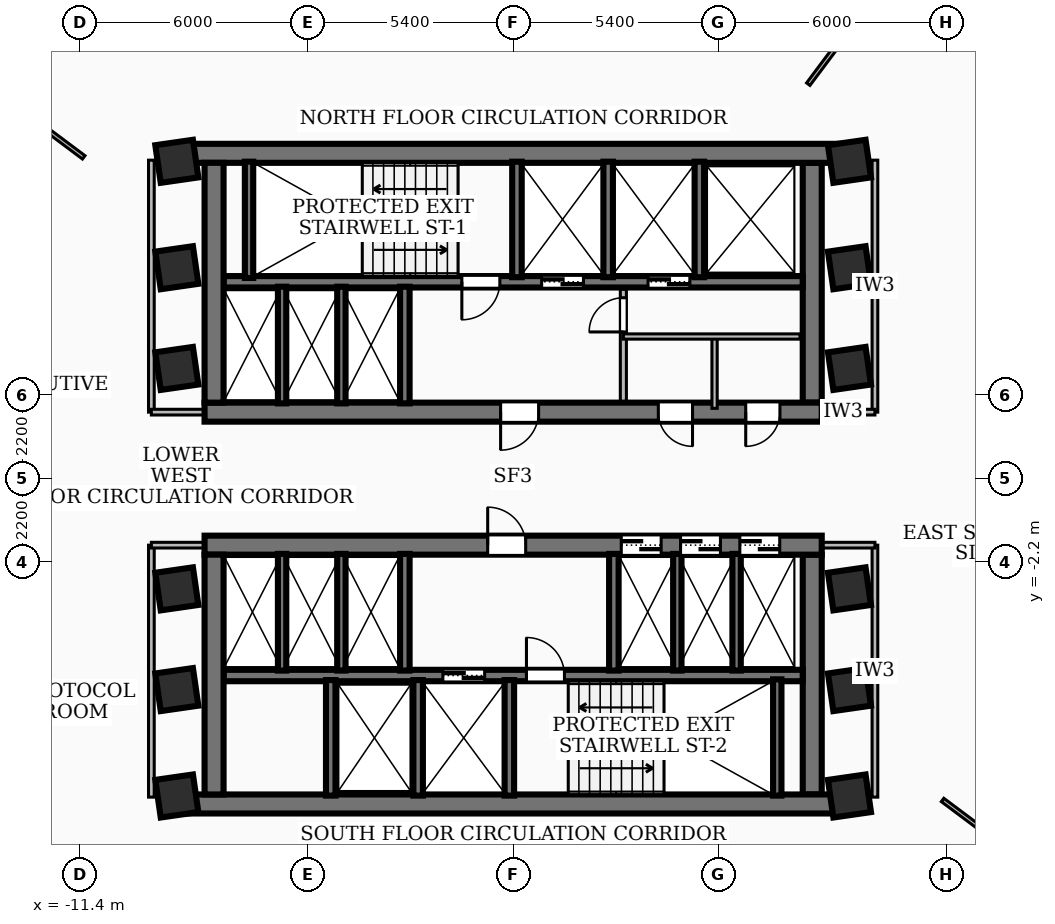
"""IFC4 building model, lengths in metres.
Left out: names, types, materials, properties, quantities, classifications, styles, units other than length and angle.
Written with IfcOpenShell. Run it as: python <this file> out.ifc"""

import sys

from ifc_helpers import new_model, si_unit, direction, frame, frame_2d, origin, origin_2d, place, context, subcontext, project, spatial, rectangle, extrude, element, fill, save


model = new_model("IFC4")
c1 = context("Model", 3, precision=1e-05, world=origin(), true_north=direction((0.0, 1.0)))
c2 = subcontext(c1, "Body", "Model", "MODEL_VIEW")
j1 = project(units=[si_unit("LENGTHUNIT", "METRE"), si_unit("PLANEANGLEUNIT", "RADIAN")], contexts=[c1])
p1 = place(None, origin())
s1 = spatial("IfcSite", under=j1, at=p1, CompositionType="ELEMENT")
p2 = place(p1, origin())
s2 = spatial("IfcBuilding", under=s1, at=p2, CompositionType="ELEMENT")
p3 = place(p2, frame((0.0, 0.0, 89.28)))
s3 = spatial("IfcBuildingStorey", under=s2, at=p3, CompositionType="ELEMENT", Elevation=89.28)
p4 = place(p3, frame((-8.78, 8.56, 0.0), z_axis=(0.0, 0.0, 1.0), x_axis=(1.0, 0.0, 0.0)))
e1 = element("IfcWall", 1, at=p4, inside=s3, PredefinedType="SHEAR", context=c2, shape_type="SweptSolid", body=[
    extrude(rectangle(XDim=17.56, YDim=0.5, at=frame_2d((8.78, 0.0))), origin(), (0.0, 0.0, 1.0), 3.34),
])
p5 = place(p3, frame((8.12, 1.75, 0.0), z_axis=(0.0, 0.0, 1.0), x_axis=(-1.0, 0.0, 0.0)))
e2 = element("IfcWall", 2, at=p5, inside=s3, PredefinedType="SHEAR", context=c2, shape_type="SweptSolid", body=[
    extrude(rectangle(XDim=16.24, YDim=0.5, at=frame_2d((8.12, 0.0))), origin(), (0.0, 0.0, 1.0), 3.34),
])
p6 = place(p5, frame((7.45, 0.0, 0.0)))
e3 = element("IfcOpeningElement", 3, at=p6, cuts=e2, PredefinedType="OPENING", context=c2, shape_type="SweptSolid", body=[
    extrude(rectangle(XDim=1.0, YDim=2.1, at=frame_2d((0.5, 1.05))), frame((0.0, 0.26, 0.0), z_axis=(0.0, -1.0, 0.0), x_axis=(1.0, 0.0, 0.0)), (0.0, 0.0, 1.0), 0.52),
])
p7 = place(p5, frame((3.4, 0.0, 0.0)))
e4 = element("IfcOpeningElement", 4, at=p7, cuts=e2, PredefinedType="OPENING", context=c2, shape_type="SweptSolid", body=[
    extrude(rectangle(XDim=0.9, YDim=2.06, at=frame_2d((0.45, 1.03))), frame((0.0, 0.26, 0.0), z_axis=(0.0, -1.0, 0.0), x_axis=(1.0, 0.0, 0.0)), (0.0, 0.0, 1.0), 0.52),
])
p8 = place(p5, frame((1.1, 0.0, 0.0)))
e5 = element("IfcOpeningElement", 5, at=p8, cuts=e2, PredefinedType="OPENING", context=c2, shape_type="SweptSolid", body=[
    extrude(rectangle(XDim=0.9, YDim=2.06, at=frame_2d((0.45, 1.03))), frame((0.0, 0.26, 0.0), z_axis=(0.0, -1.0, 0.0), x_axis=(1.0, 0.0, 0.0)), (0.0, 0.0, 1.0), 0.52),
])
for number, where, z_axis, x_axis in (
    (6, (-7.87, 2.0, 0.0), (0.0, 0.0, 1.0), (0.0, 1.0, 0.0)),
    (7, (7.87, 8.31, 0.0), (0.0, 0.0, 1.0), (0.0, -1.0, 0.0)),
):
    element("IfcWall", number, at=place(p3, frame(where, z_axis=z_axis, x_axis=x_axis)), inside=s3, PredefinedType="SHEAR", context=c2, shape_type="SweptSolid", body=[
        extrude(rectangle(XDim=6.31, YDim=0.5, at=frame_2d((3.155, 0.0))), origin(), (0.0, 0.0, 1.0), 3.34),
    ])
p9 = place(p3, frame((7.62, 5.18, 0.0), z_axis=(0.0, 0.0, 1.0), x_axis=(-1.0, 0.0, 0.0)))
e8 = element("IfcWall", 8, at=p9, inside=s3, PredefinedType="SOLIDWALL", context=c2, shape_type="SweptSolid", body=[
    extrude(rectangle(XDim=15.24, YDim=0.3, at=frame_2d((7.62, 0.0))), origin(), (0.0, 0.0, 1.0), 3.34),
])
p10 = place(p9, frame((5.77, 0.0, 0.0)))
e9 = element("IfcOpeningElement", 9, at=p10, cuts=e8, PredefinedType="OPENING", context=c2, shape_type="SweptSolid", body=[
    extrude(rectangle(XDim=1.1, YDim=2.15, at=frame_2d((0.55, 1.075))), frame((0.0, 0.16, 0.0), z_axis=(0.0, -1.0, 0.0), x_axis=(1.0, 0.0, 0.0)), (0.0, 0.0, 1.0), 0.32),
])
p11 = place(p9, frame((2.97, 0.0, 0.0)))
e10 = element("IfcOpeningElement", 10, at=p11, cuts=e8, PredefinedType="OPENING", context=c2, shape_type="SweptSolid", body=[
    extrude(rectangle(XDim=1.1, YDim=2.15, at=frame_2d((0.55, 1.075))), frame((0.0, 0.16, 0.0), z_axis=(0.0, -1.0, 0.0), x_axis=(1.0, 0.0, 0.0)), (0.0, 0.0, 1.0), 0.32),
])
p12 = place(p9, frame((7.97, 0.0, 0.0)))
e11 = element("IfcOpeningElement", 11, at=p12, cuts=e8, PredefinedType="OPENING", context=c2, shape_type="SweptSolid", body=[
    extrude(rectangle(XDim=1.0, YDim=2.1, at=frame_2d((0.5, 1.05))), frame((0.0, 0.16, 0.0), z_axis=(0.0, -1.0, 0.0), x_axis=(1.0, 0.0, 0.0)), (0.0, 0.0, 1.0), 0.32),
])
p13 = place(p3, frame((8.78, -8.56, 0.0), z_axis=(0.0, 0.0, 1.0), x_axis=(-1.0, 0.0, 0.0)))
e12 = element("IfcWall", 12, at=p13, inside=s3, PredefinedType="SHEAR", context=c2, shape_type="SweptSolid", body=[
    extrude(rectangle(XDim=17.56, YDim=0.5, at=frame_2d((8.78, 0.0))), origin(), (0.0, 0.0, 1.0), 3.34),
])
p14 = place(p3, frame((-8.12, -1.75, 0.0), z_axis=(0.0, 0.0, 1.0), x_axis=(1.0, 0.0, 0.0)))
e13 = element("IfcWall", 13, at=p14, inside=s3, PredefinedType="SHEAR", context=c2, shape_type="SweptSolid", body=[
    extrude(rectangle(XDim=16.24, YDim=0.5, at=frame_2d((8.12, 0.0))), origin(), (0.0, 0.0, 1.0), 3.34),
])
p15 = place(p14, frame((7.45, 0.0, 0.0)))
e14 = element("IfcOpeningElement", 14, at=p15, cuts=e13, PredefinedType="OPENING", context=c2, shape_type="SweptSolid", body=[
    extrude(rectangle(XDim=1.0, YDim=2.1, at=frame_2d((0.5, 1.05))), frame((0.0, 0.26, 0.0), z_axis=(0.0, -1.0, 0.0), x_axis=(1.0, 0.0, 0.0)), (0.0, 0.0, 1.0), 0.52),
])
p16 = place(p14, frame((10.965, 0.0, 0.0)))
e15 = element("IfcOpeningElement", 15, at=p16, cuts=e13, PredefinedType="OPENING", context=c2, shape_type="SweptSolid", body=[
    extrude(rectangle(XDim=1.05, YDim=2.15, at=frame_2d((0.525, 1.075))), frame((0.0, 0.26, 0.0), z_axis=(0.0, -1.0, 0.0), x_axis=(1.0, 0.0, 0.0)), (0.0, 0.0, 1.0), 0.52),
])
p17 = place(p14, frame((12.525, 0.0, 0.0)))
e16 = element("IfcOpeningElement", 16, at=p17, cuts=e13, PredefinedType="OPENING", context=c2, shape_type="SweptSolid", body=[
    extrude(rectangle(XDim=1.05, YDim=2.15, at=frame_2d((0.525, 1.075))), frame((0.0, 0.26, 0.0), z_axis=(0.0, -1.0, 0.0), x_axis=(1.0, 0.0, 0.0)), (0.0, 0.0, 1.0), 0.52),
])
p18 = place(p14, frame((14.085, 0.0, 0.0)))
e17 = element("IfcOpeningElement", 17, at=p18, cuts=e13, PredefinedType="OPENING", context=c2, shape_type="SweptSolid", body=[
    extrude(rectangle(XDim=1.05, YDim=2.15, at=frame_2d((0.525, 1.075))), frame((0.0, 0.26, 0.0), z_axis=(0.0, -1.0, 0.0), x_axis=(1.0, 0.0, 0.0)), (0.0, 0.0, 1.0), 0.52),
])
for number, where, z_axis, x_axis in (
    (18, (-7.87, -8.31, 0.0), (0.0, 0.0, 1.0), (0.0, 1.0, 0.0)),
    (19, (7.87, -2.0, 0.0), (0.0, 0.0, 1.0), (0.0, -1.0, 0.0)),
):
    element("IfcWall", number, at=place(p3, frame(where, z_axis=z_axis, x_axis=x_axis)), inside=s3, PredefinedType="SHEAR", context=c2, shape_type="SweptSolid", body=[
        extrude(rectangle(XDim=6.31, YDim=0.5, at=frame_2d((3.155, 0.0))), origin(), (0.0, 0.0, 1.0), 3.34),
    ])
p19 = place(p3, frame((-7.62, -5.18, 0.0), z_axis=(0.0, 0.0, 1.0), x_axis=(1.0, 0.0, 0.0)))
e20 = element("IfcWall", 20, at=p19, inside=s3, PredefinedType="SOLIDWALL", context=c2, shape_type="SweptSolid", body=[
    extrude(rectangle(XDim=15.24, YDim=0.3, at=frame_2d((7.62, 0.0))), origin(), (0.0, 0.0, 1.0), 3.34),
])
p20 = place(p19, frame((5.77, 0.0, 0.0)))
e21 = element("IfcOpeningElement", 21, at=p20, cuts=e20, PredefinedType="OPENING", context=c2, shape_type="SweptSolid", body=[
    extrude(rectangle(XDim=1.1, YDim=2.15, at=frame_2d((0.55, 1.075))), frame((0.0, 0.16, 0.0), z_axis=(0.0, -1.0, 0.0), x_axis=(1.0, 0.0, 0.0)), (0.0, 0.0, 1.0), 0.32),
])
p21 = place(p19, frame((7.97, 0.0, 0.0)))
e22 = element("IfcOpeningElement", 22, at=p21, cuts=e20, PredefinedType="OPENING", context=c2, shape_type="SweptSolid", body=[
    extrude(rectangle(XDim=1.0, YDim=2.1, at=frame_2d((0.5, 1.05))), frame((0.0, 0.16, 0.0), z_axis=(0.0, -1.0, 0.0), x_axis=(1.0, 0.0, 0.0)), (0.0, 0.0, 1.0), 0.32),
])
for number, where, z_axis, x_axis in (
    (23, (-6.95, 5.28, 0.0), (0.0, 0.0, 1.0), (0.0, 1.0, 0.0)),
    (24, (6.95, -8.34, 0.0), (0.0, 0.0, 1.0), (0.0, 1.0, 0.0)),
):
    element("IfcWall", number, at=place(p3, frame(where, z_axis=z_axis, x_axis=x_axis)), inside=s3, PredefinedType="SOLIDWALL", context=c2, shape_type="SweptSolid", body=[
        extrude(rectangle(XDim=3.06, YDim=0.22, at=frame_2d((1.53, 0.0))), origin(), (0.0, 0.0, 1.0), 3.34),
    ])
for number, where, z_axis, x_axis in (
    (25, (0.1, 5.3, 0.0), (0.0, 0.0, 1.0), (0.0, 1.0, 0.0)),
    (26, (2.5, 5.3, 0.0), (0.0, 0.0, 1.0), (0.0, 1.0, 0.0)),
    (27, (4.9, 5.3, 0.0), (0.0, 0.0, 1.0), (0.0, 1.0, 0.0)),
):
    element("IfcWall", number, at=place(p3, frame(where, z_axis=z_axis, x_axis=x_axis)), inside=s3, PredefinedType="SOLIDWALL", context=c2, shape_type="SweptSolid", body=[
        extrude(rectangle(XDim=3.04, YDim=0.25, at=frame_2d((1.52, 0.0))), origin(), (0.0, 0.0, 1.0), 3.34),
    ])
p22 = place(p3, frame((-2.85, 1.98, 0.0), z_axis=(0.0, 0.0, 1.0), x_axis=(0.0, 1.0, 0.0)))
e28 = element("IfcWall", 28, at=p22, inside=s3, PredefinedType="SOLIDWALL", context=c2, shape_type="SweptSolid", body=[
    extrude(rectangle(XDim=3.07, YDim=0.25, at=frame_2d((1.535, 0.0))), origin(), (0.0, 0.0, 1.0), 3.34),
])
for number, where, z_axis, x_axis in (
    (29, (-0.1, -8.34, 0.0), (0.0, 0.0, 1.0), (0.0, 1.0, 0.0)),
    (30, (-2.5, -8.34, 0.0), (0.0, 0.0, 1.0), (0.0, 1.0, 0.0)),
    (31, (-4.8, -8.34, 0.0), (0.0, 0.0, 1.0), (0.0, 1.0, 0.0)),
):
    element("IfcWall", number, at=place(p3, frame(where, z_axis=z_axis, x_axis=x_axis)), inside=s3, PredefinedType="SOLIDWALL", context=c2, shape_type="SweptSolid", body=[
        extrude(rectangle(XDim=3.04, YDim=0.25, at=frame_2d((1.52, 0.0))), origin(), (0.0, 0.0, 1.0), 3.34),
    ])
for number, where, z_axis, x_axis in (
    (32, (-2.85, -5.05, 0.0), (0.0, 0.0, 1.0), (0.0, 1.0, 0.0)),
    (33, (2.65, -5.05, 0.0), (0.0, 0.0, 1.0), (0.0, 1.0, 0.0)),
):
    element("IfcWall", number, at=place(p3, frame(where, z_axis=z_axis, x_axis=x_axis)), inside=s3, PredefinedType="SOLIDWALL", context=c2, shape_type="SweptSolid", body=[
        extrude(rectangle(XDim=3.07, YDim=0.25, at=frame_2d((1.535, 0.0))), origin(), (0.0, 0.0, 1.0), 3.34),
    ])
for number, where, z_axis, x_axis in (
    (34, (-6.08, 1.98, 0.0), (0.0, 0.0, 1.0), (0.0, 1.0, 0.0)),
    (35, (-4.52, 1.98, 0.0), (0.0, 0.0, 1.0), (0.0, 1.0, 0.0)),
    (36, (4.32, -5.05, 0.0), (0.0, 0.0, 1.0), (0.0, 1.0, 0.0)),
    (37, (5.88, -5.05, 0.0), (0.0, 0.0, 1.0), (0.0, 1.0, 0.0)),
    (38, (-6.08, -5.05, 0.0), (0.0, 0.0, 1.0), (0.0, 1.0, 0.0)),
    (39, (-4.52, -5.05, 0.0), (0.0, 0.0, 1.0), (0.0, 1.0, 0.0)),
):
    element("IfcWall", number, at=place(p3, frame(where, z_axis=z_axis, x_axis=x_axis)), inside=s3, PredefinedType="SOLIDWALL", context=c2, shape_type="SweptSolid", body=[
        extrude(rectangle(XDim=3.07, YDim=0.22, at=frame_2d((1.535, 0.0))), origin(), (0.0, 0.0, 1.0), 3.34),
    ])
for number, where, z_axis, x_axis in (
    (40, (-8.85, -5.55, 0.0), (0.0, 0.0, 1.0), (0.99, 0.143, 0.0)),
    (41, (-8.85, -2.9, 0.0), (0.0, 0.0, 1.0), (0.99, 0.143, 0.0)),
    (42, (-8.85, 2.9, 0.0), (0.0, 0.0, 1.0), (0.99, 0.143, 0.0)),
    (43, (-8.85, 5.55, 0.0), (0.0, 0.0, 1.0), (0.99, 0.143, 0.0)),
    (44, (8.85, -5.55, 0.0), (0.0, 0.0, 1.0), (0.99, 0.143, 0.0)),
    (45, (8.85, -2.9, 0.0), (0.0, 0.0, 1.0), (0.99, 0.143, 0.0)),
    (46, (8.85, 2.9, 0.0), (0.0, 0.0, 1.0), (0.99, 0.143, 0.0)),
    (47, (8.85, 5.55, 0.0), (0.0, 0.0, 1.0), (0.99, 0.143, 0.0)),
    (48, (-8.85, 8.35, 0.0), (0.0, 0.0, 1.0), (0.99, 0.143, 0.0)),
    (49, (8.85, -8.35, 0.0), (0.0, 0.0, 1.0), (0.99, 0.143, 0.0)),
    (50, (8.85, 8.35, 0.0), (0.0, 0.0, 1.0), (0.99, 0.143, 0.0)),
    (51, (-8.85, -8.35, 0.0), (0.0, 0.0, 1.0), (0.99, 0.143, 0.0)),
):
    element("IfcColumn", number, at=place(p3, frame(where, z_axis=z_axis, x_axis=x_axis)), inside=s3, PredefinedType="COLUMN", context=c2, shape_type="SweptSolid", body=[
        extrude(rectangle(XDim=1.0, YDim=1.0, at=origin_2d()), origin(), (0.0, 0.0, 1.0), 3.6),
    ])
p23 = place(p3, frame((2.9, 2.04, 0.0), z_axis=(0.0, 0.0, 1.0), x_axis=(0.0, 1.0, 0.0)))
e52 = element("IfcWall", 52, at=p23, inside=s3, PredefinedType="PARTITIONING", context=c2, shape_type="SweptSolid", body=[
    extrude(rectangle(XDim=2.94, YDim=0.16, at=frame_2d((1.47, 0.0))), origin(), (0.0, 0.0, 1.0), 2.405),
])
p24 = place(p23, frame((1.82, 0.0, 0.0)))
e53 = element("IfcOpeningElement", 53, at=p24, cuts=e52, PredefinedType="OPENING", context=c2, shape_type="SweptSolid", body=[
    extrude(rectangle(XDim=0.9, YDim=2.06, at=frame_2d((0.45, 1.03))), frame((0.0, 0.09, 0.0), z_axis=(0.0, -1.0, 0.0), x_axis=(1.0, 0.0, 0.0)), (0.0, 0.0, 1.0), 0.18),
])
p25 = place(p3, frame((2.9, 3.74, 0.0), z_axis=(0.0, 0.0, 1.0), x_axis=(1.0, 0.0, 0.0)))
e54 = element("IfcWall", 54, at=p25, inside=s3, PredefinedType="PARTITIONING", context=c2, shape_type="SweptSolid", body=[
    extrude(rectangle(XDim=4.65, YDim=0.138, at=frame_2d((2.325, 0.0))), origin(), (0.0, 0.0, 1.0), 3.34),
])
p26 = place(p3, frame((5.3, 1.85, 0.0), z_axis=(0.0, 0.0, 1.0), x_axis=(0.0, 1.0, 0.0)))
e55 = element("IfcWall", 55, at=p26, inside=s3, PredefinedType="PARTITIONING", context=c2, shape_type="SweptSolid", body=[
    extrude(rectangle(XDim=1.89, YDim=0.138, at=frame_2d((0.945, 0.0))), origin(), (0.0, 0.0, 1.0), 2.405),
])
p27 = place(p3, frame((-9.52, 1.75, 0.0), z_axis=(0.0, 0.0, 1.0), x_axis=(0.0, 1.0, 0.0)))
e56 = element("IfcWall", 56, at=p27, inside=s3, PredefinedType="PARTITIONING", context=c2, shape_type="SweptSolid", body=[
    extrude(rectangle(XDim=6.63, YDim=0.15, at=frame_2d((3.315, 0.0))), origin(), (0.0, 0.0, 1.0), 2.486),
])
p28 = place(p3, frame((-7.85, 1.75, 0.0), z_axis=(0.0, 0.0, 1.0), x_axis=(-1.0, 0.0, 0.0)))
e57 = element("IfcWall", 57, at=p28, inside=s3, PredefinedType="PARTITIONING", context=c2, shape_type="SweptSolid", body=[
    extrude(rectangle(XDim=1.67, YDim=0.15, at=frame_2d((0.835, 0.0))), origin(), (0.0, 0.0, 1.0), 2.405),
])
p29 = place(p3, frame((-9.52, -8.38, 0.0), z_axis=(0.0, 0.0, 1.0), x_axis=(0.0, 1.0, 0.0)))
e58 = element("IfcWall", 58, at=p29, inside=s3, PredefinedType="PARTITIONING", context=c2, shape_type="SweptSolid", body=[
    extrude(rectangle(XDim=6.63, YDim=0.15, at=frame_2d((3.315, 0.0))), origin(), (0.0, 0.0, 1.0), 2.486),
])
p30 = place(p3, frame((-7.85, -1.75, 0.0), z_axis=(0.0, 0.0, 1.0), x_axis=(-1.0, 0.0, 0.0)))
e59 = element("IfcWall", 59, at=p30, inside=s3, PredefinedType="PARTITIONING", context=c2, shape_type="SweptSolid", body=[
    extrude(rectangle(XDim=1.67, YDim=0.15, at=frame_2d((0.835, 0.0))), origin(), (0.0, 0.0, 1.0), 2.405),
])
p31 = place(p3, frame((9.52, 1.75, 0.0), z_axis=(0.0, 0.0, 1.0), x_axis=(0.0, 1.0, 0.0)))
e60 = element("IfcWall", 60, at=p31, inside=s3, PredefinedType="PARTITIONING", context=c2, shape_type="SweptSolid", body=[
    extrude(rectangle(XDim=6.63, YDim=0.15, at=frame_2d((3.315, 0.0))), origin(), (0.0, 0.0, 1.0), 2.486),
])
p32 = place(p3, frame((7.85, 1.75, 0.0), z_axis=(0.0, 0.0, 1.0), x_axis=(1.0, 0.0, 0.0)))
e61 = element("IfcWall", 61, at=p32, inside=s3, PredefinedType="PARTITIONING", context=c2, shape_type="SweptSolid", body=[
    extrude(rectangle(XDim=1.67, YDim=0.15, at=frame_2d((0.835, 0.0))), origin(), (0.0, 0.0, 1.0), 2.405),
])
p33 = place(p3, frame((9.52, -8.38, 0.0), z_axis=(0.0, 0.0, 1.0), x_axis=(0.0, 1.0, 0.0)))
e62 = element("IfcWall", 62, at=p33, inside=s3, PredefinedType="PARTITIONING", context=c2, shape_type="SweptSolid", body=[
    extrude(rectangle(XDim=6.63, YDim=0.15, at=frame_2d((3.315, 0.0))), origin(), (0.0, 0.0, 1.0), 2.486),
])
p34 = place(p3, frame((7.85, -1.75, 0.0), z_axis=(0.0, 0.0, 1.0), x_axis=(1.0, 0.0, 0.0)))
e63 = element("IfcWall", 63, at=p34, inside=s3, PredefinedType="PARTITIONING", context=c2, shape_type="SweptSolid", body=[
    extrude(rectangle(XDim=1.67, YDim=0.15, at=frame_2d((0.835, 0.0))), origin(), (0.0, 0.0, 1.0), 2.405),
])
p35 = place(p3, frame((7.766, 10.38, 0.0), z_axis=(0.0, 0.0, 1.0), x_axis=(0.598966195252, 0.800774310867, 0.0)))
e64 = element("IfcWall", 64, at=p35, inside=s3, PredefinedType="PARTITIONING", context=c2, shape_type="SweptSolid", body=[
    extrude(rectangle(XDim=6.691, YDim=0.11, at=frame_2d((3.346, 0.0))), origin(), (0.0, 0.0, 1.0), 2.644),
])
for number, where, z_axis, x_axis in (
    (65, (-11.3, 8.454, 0.0), (0.0, 0.0, 1.0), (-0.801, 0.599, 0.0)),
    (66, (11.3, -8.454, 0.0), (0.0, 0.0, 1.0), (0.801, -0.599, 0.0)),
):
    element("IfcWall", number, at=place(p3, frame(where, z_axis=z_axis, x_axis=x_axis)), inside=s3, PredefinedType="PARTITIONING", context=c2, shape_type="SweptSolid", body=[
        extrude(rectangle(XDim=5.542, YDim=0.11, at=frame_2d((2.771, 0.0))), origin(), (0.0, 0.0, 1.0), 3.34),
    ])
p36 = place(p6, origin())
e67 = element("IfcDoor", 67, at=p36, inside=s3, OperationType="SINGLE_SWING_RIGHT", PredefinedType="DOOR", context=c2, shape_type="SweptSolid", body=[
    extrude(rectangle(XDim=1.0, YDim=2.1, at=frame_2d((0.5, 1.05))), frame((0.0, 0.025, 0.0), z_axis=(0.0, -1.0, 0.0), x_axis=(1.0, 0.0, 0.0)), (0.0, 0.0, 1.0), 0.05),
])
fill(e3, e67)
p37 = place(p15, origin())
e68 = element("IfcDoor", 68, at=p37, inside=s3, OperationType="SINGLE_SWING_LEFT", PredefinedType="DOOR", context=c2, shape_type="SweptSolid", body=[
    extrude(rectangle(XDim=1.0, YDim=2.1, at=frame_2d((0.5, 1.05))), frame((0.0, 0.025, 0.0), z_axis=(0.0, -1.0, 0.0), x_axis=(1.0, 0.0, 0.0)), (0.0, 0.0, 1.0), 0.05),
])
fill(e14, e68)
p38 = place(p10, origin())
e69 = element("IfcDoor", 69, at=p38, inside=s3, OperationType="DOUBLE_DOOR_SLIDING", PredefinedType="DOOR", context=c2, shape_type="SweptSolid", body=[
    extrude(rectangle(XDim=1.1, YDim=2.15, at=frame_2d((0.55, 1.075))), frame((0.0, 0.025, 0.0), z_axis=(0.0, -1.0, 0.0), x_axis=(1.0, 0.0, 0.0)), (0.0, 0.0, 1.0), 0.05),
])
fill(e9, e69)
p39 = place(p11, origin())
e70 = element("IfcDoor", 70, at=p39, inside=s3, OperationType="DOUBLE_DOOR_SLIDING", PredefinedType="DOOR", context=c2, shape_type="SweptSolid", body=[
    extrude(rectangle(XDim=1.1, YDim=2.15, at=frame_2d((0.55, 1.075))), frame((0.0, 0.025, 0.0), z_axis=(0.0, -1.0, 0.0), x_axis=(1.0, 0.0, 0.0)), (0.0, 0.0, 1.0), 0.05),
])
fill(e10, e70)
p40 = place(p12, origin())
e71 = element("IfcDoor", 71, at=p40, inside=s3, OperationType="SINGLE_SWING_RIGHT", PredefinedType="DOOR", context=c2, shape_type="SweptSolid", body=[
    extrude(rectangle(XDim=1.0, YDim=2.1, at=frame_2d((0.5, 1.05))), frame((0.0, 0.025, 0.0), z_axis=(0.0, -1.0, 0.0), x_axis=(1.0, 0.0, 0.0)), (0.0, 0.0, 1.0), 0.05),
])
fill(e11, e71)
p41 = place(p20, origin())
e72 = element("IfcDoor", 72, at=p41, inside=s3, OperationType="DOUBLE_DOOR_SLIDING", PredefinedType="DOOR", context=c2, shape_type="SweptSolid", body=[
    extrude(rectangle(XDim=1.1, YDim=2.15, at=frame_2d((0.55, 1.075))), frame((0.0, 0.025, 0.0), z_axis=(0.0, -1.0, 0.0), x_axis=(1.0, 0.0, 0.0)), (0.0, 0.0, 1.0), 0.05),
])
fill(e21, e72)
p42 = place(p21, origin())
e73 = element("IfcDoor", 73, at=p42, inside=s3, OperationType="SINGLE_SWING_LEFT", PredefinedType="DOOR", context=c2, shape_type="SweptSolid", body=[
    extrude(rectangle(XDim=1.0, YDim=2.1, at=frame_2d((0.5, 1.05))), frame((0.0, 0.025, 0.0), z_axis=(0.0, -1.0, 0.0), x_axis=(1.0, 0.0, 0.0)), (0.0, 0.0, 1.0), 0.05),
])
fill(e22, e73)
p43 = place(p16, origin())
e74 = element("IfcDoor", 74, at=p43, inside=s3, OperationType="DOUBLE_DOOR_SLIDING", PredefinedType="DOOR", context=c2, shape_type="SweptSolid", body=[
    extrude(rectangle(XDim=1.05, YDim=2.15, at=frame_2d((0.525, 1.075))), frame((0.0, 0.025, 0.0), z_axis=(0.0, -1.0, 0.0), x_axis=(1.0, 0.0, 0.0)), (0.0, 0.0, 1.0), 0.05),
])
fill(e15, e74)
p44 = place(p17, origin())
e75 = element("IfcDoor", 75, at=p44, inside=s3, OperationType="DOUBLE_DOOR_SLIDING", PredefinedType="DOOR", context=c2, shape_type="SweptSolid", body=[
    extrude(rectangle(XDim=1.05, YDim=2.15, at=frame_2d((0.525, 1.075))), frame((0.0, 0.025, 0.0), z_axis=(0.0, -1.0, 0.0), x_axis=(1.0, 0.0, 0.0)), (0.0, 0.0, 1.0), 0.05),
])
fill(e16, e75)
p45 = place(p18, origin())
e76 = element("IfcDoor", 76, at=p45, inside=s3, OperationType="DOUBLE_DOOR_SLIDING", PredefinedType="DOOR", context=c2, shape_type="SweptSolid", body=[
    extrude(rectangle(XDim=1.05, YDim=2.15, at=frame_2d((0.525, 1.075))), frame((0.0, 0.025, 0.0), z_axis=(0.0, -1.0, 0.0), x_axis=(1.0, 0.0, 0.0)), (0.0, 0.0, 1.0), 0.05),
])
fill(e17, e76)
p46 = place(p7, origin())
e77 = element("IfcDoor", 77, at=p46, inside=s3, OperationType="SINGLE_SWING_LEFT", PredefinedType="DOOR", context=c2, shape_type="SweptSolid", body=[
    extrude(rectangle(XDim=0.9, YDim=2.06, at=frame_2d((0.45, 1.03))), frame((0.0, 0.025, 0.0), z_axis=(0.0, -1.0, 0.0), x_axis=(1.0, 0.0, 0.0)), (0.0, 0.0, 1.0), 0.05),
])
fill(e4, e77)
p47 = place(p8, origin())
e78 = element("IfcDoor", 78, at=p47, inside=s3, OperationType="SINGLE_SWING_RIGHT", PredefinedType="DOOR", context=c2, shape_type="SweptSolid", body=[
    extrude(rectangle(XDim=0.9, YDim=2.06, at=frame_2d((0.45, 1.03))), frame((0.0, 0.025, 0.0), z_axis=(0.0, -1.0, 0.0), x_axis=(1.0, 0.0, 0.0)), (0.0, 0.0, 1.0), 0.05),
])
fill(e5, e78)
p48 = place(p24, origin())
e79 = element("IfcDoor", 79, at=p48, inside=s3, OperationType="SINGLE_SWING_LEFT", PredefinedType="DOOR", context=c2, shape_type="SweptSolid", body=[
    extrude(rectangle(XDim=0.9, YDim=2.06, at=frame_2d((0.45, 1.03))), frame((0.0, 0.025, 0.0), z_axis=(0.0, -1.0, 0.0), x_axis=(1.0, 0.0, 0.0)), (0.0, 0.0, 1.0), 0.05),
])
fill(e53, e79)
save(model, sys.argv[1])
